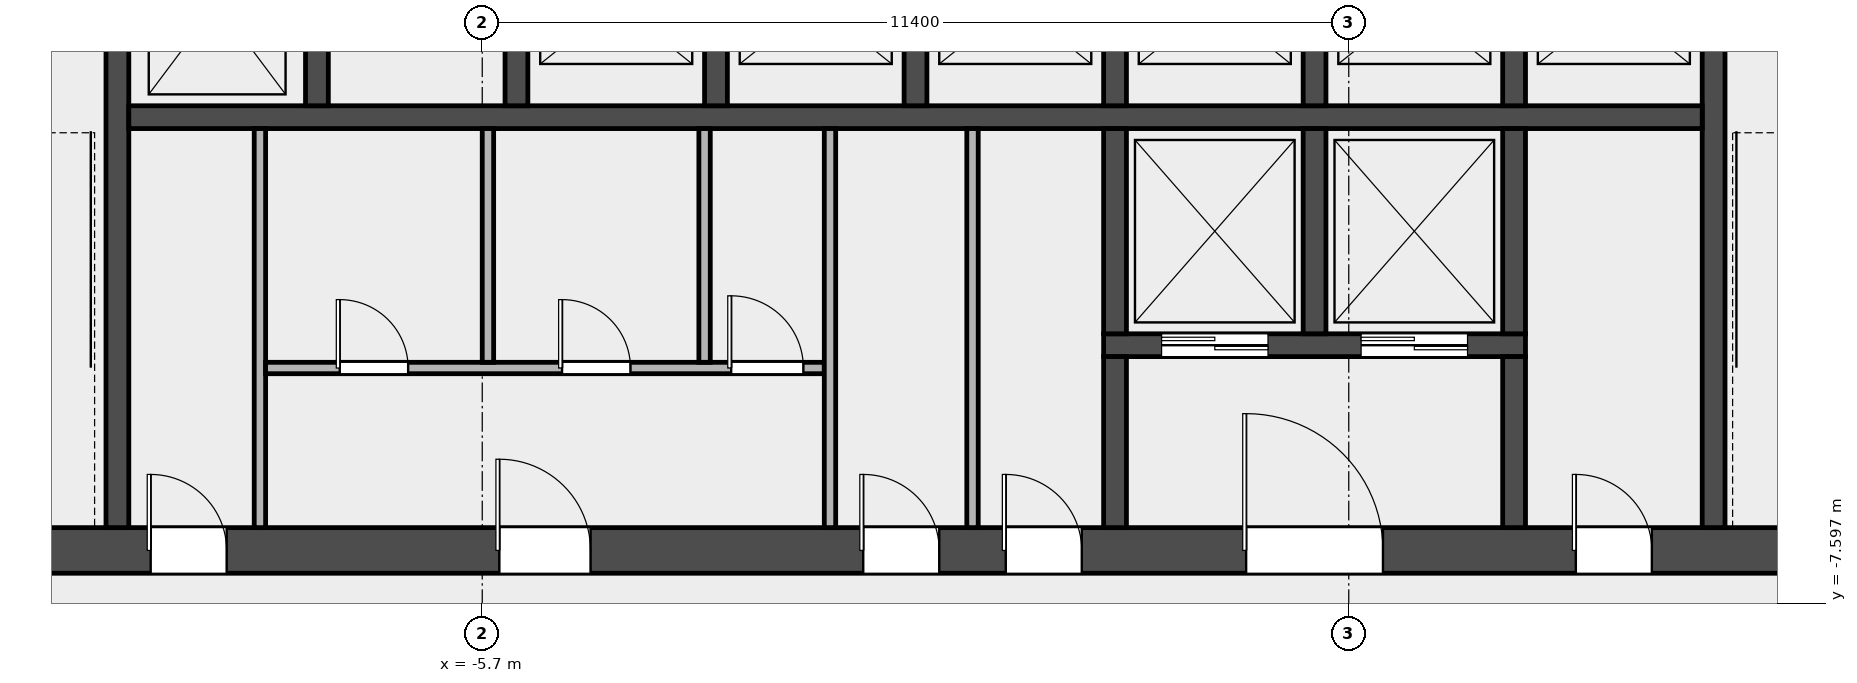
"""IFC4 building model, lengths in metres.
Left out: names, types, materials, properties, quantities, classifications, styles, units other than length and angle.
Written with IfcOpenShell. Run it as: python <this file> out.ifc"""

import sys

from ifc_helpers import new_model, si_unit, direction, frame, frame_2d, origin, place, context, subcontext, project, spatial, rectangle, extrude, element, fill, save


model = new_model("IFC4")
c1 = context("Model", 3, precision=1e-05, world=origin(), true_north=direction((0.0, 1.0)))
c2 = subcontext(c1, "Body", "Model", "MODEL_VIEW")
j1 = project(units=[si_unit("LENGTHUNIT", "METRE"), si_unit("PLANEANGLEUNIT", "RADIAN")], contexts=[c1])
p1 = place(None, origin())
s1 = spatial("IfcSite", under=j1, at=p1, CompositionType="ELEMENT")
p2 = place(p1, origin())
s2 = spatial("IfcBuilding", under=s1, at=p2, CompositionType="ELEMENT")
p3 = place(p2, frame((0.0, 0.0, 157.0)))
s3 = spatial("IfcBuildingStorey", under=s2, at=p3, CompositionType="ELEMENT", Elevation=157.0)
p4 = place(p3, frame((-14.4, -6.9, 0.0), z_axis=(0.0, 0.0, 1.0), x_axis=(1.0, 0.0, 0.0)))
e1 = element("IfcWall", 1, at=p4, inside=s3, PredefinedType="SHEAR", context=c2, shape_type="SweptSolid", body=[
    extrude(rectangle(XDim=28.8, YDim=0.6, at=frame_2d((14.4, 0.0))), origin(), (0.0, 0.0, 1.0), 3.7),
])
p5 = place(p4, frame((4.337, 0.0, 0.0)))
e2 = element("IfcOpeningElement", 2, at=p5, cuts=e1, PredefinedType="OPENING", context=c2, shape_type="SweptSolid", body=[
    extrude(rectangle(XDim=1.0, YDim=2.1, at=frame_2d((0.5, 1.05))), frame((0.0, 0.312, 0.0), z_axis=(0.0, -1.0, 0.0), x_axis=(1.0, 0.0, 0.0)), (0.0, 0.0, 1.0), 0.624),
])
p6 = place(p4, frame((8.925, 0.0, 0.0)))
e3 = element("IfcOpeningElement", 3, at=p6, cuts=e1, PredefinedType="OPENING", context=c2, shape_type="SweptSolid", body=[
    extrude(rectangle(XDim=1.2, YDim=2.1, at=frame_2d((0.6, 1.05))), frame((0.0, 0.312, 0.0), z_axis=(0.0, -1.0, 0.0), x_axis=(1.0, 0.0, 0.0)), (0.0, 0.0, 1.0), 0.624),
])
p7 = place(p4, frame((13.712, 0.0, 0.0)))
e4 = element("IfcOpeningElement", 4, at=p7, cuts=e1, PredefinedType="OPENING", context=c2, shape_type="SweptSolid", body=[
    extrude(rectangle(XDim=1.0, YDim=2.1, at=frame_2d((0.5, 1.05))), frame((0.0, 0.312, 0.0), z_axis=(0.0, -1.0, 0.0), x_axis=(1.0, 0.0, 0.0)), (0.0, 0.0, 1.0), 0.624),
])
p8 = place(p4, frame((15.587, 0.0, 0.0)))
e5 = element("IfcOpeningElement", 5, at=p8, cuts=e1, PredefinedType="OPENING", context=c2, shape_type="SweptSolid", body=[
    extrude(rectangle(XDim=1.0, YDim=2.1, at=frame_2d((0.5, 1.05))), frame((0.0, 0.312, 0.0), z_axis=(0.0, -1.0, 0.0), x_axis=(1.0, 0.0, 0.0)), (0.0, 0.0, 1.0), 0.624),
])
p9 = place(p4, frame((18.75, 0.0, 0.0)))
e6 = element("IfcOpeningElement", 6, at=p9, cuts=e1, PredefinedType="OPENING", context=c2, shape_type="SweptSolid", body=[
    extrude(rectangle(XDim=1.8, YDim=2.1, at=frame_2d((0.9, 1.05))), frame((0.0, 0.312, 0.0), z_axis=(0.0, -1.0, 0.0), x_axis=(1.0, 0.0, 0.0)), (0.0, 0.0, 1.0), 0.624),
])
p10 = place(p4, frame((23.087, 0.0, 0.0)))
e7 = element("IfcOpeningElement", 7, at=p10, cuts=e1, PredefinedType="OPENING", context=c2, shape_type="SweptSolid", body=[
    extrude(rectangle(XDim=1.0, YDim=2.1, at=frame_2d((0.5, 1.05))), frame((0.0, 0.312, 0.0), z_axis=(0.0, -1.0, 0.0), x_axis=(1.0, 0.0, 0.0)), (0.0, 0.0, 1.0), 0.624),
])
for number, where, z_axis, x_axis in (
    (8, (-10.5, -6.6, 0.0), (0.0, 0.0, 1.0), (0.0, 1.0, 0.0)),
    (9, (10.5, -6.6, 0.0), (0.0, 0.0, 1.0), (0.0, 1.0, 0.0)),
):
    element("IfcWall", number, at=place(p3, frame(where, z_axis=z_axis, x_axis=x_axis)), inside=s3, PredefinedType="SHEAR", context=c2, shape_type="SweptSolid", body=[
        extrude(rectangle(XDim=8.55, YDim=0.3, at=frame_2d((4.275, 0.0))), origin(), (0.0, 0.0, 1.0), 3.7),
    ])
p11 = place(p3, frame((-10.35, -1.2, 0.0), z_axis=(0.0, 0.0, 1.0), x_axis=(1.0, 0.0, 0.0)))
e10 = element("IfcWall", 10, at=p11, inside=s3, PredefinedType="SOLIDWALL", context=c2, shape_type="SweptSolid", body=[
    extrude(rectangle(XDim=20.7, YDim=0.3, at=frame_2d((10.35, 0.0))), origin(), (0.0, 0.0, 1.0), 3.7),
])
for number, where, z_axis, x_axis in (
    (11, (-7.875, -1.05, 0.0), (0.0, 0.0, 1.0), (0.0, 1.0, 0.0)),
    (12, (-5.25, -1.05, 0.0), (0.0, 0.0, 1.0), (0.0, 1.0, 0.0)),
    (13, (-2.625, -1.05, 0.0), (0.0, 0.0, 1.0), (0.0, 1.0, 0.0)),
    (14, (0.0, -1.05, 0.0), (0.0, 0.0, 1.0), (0.0, 1.0, 0.0)),
    (15, (2.625, -1.05, 0.0), (0.0, 0.0, 1.0), (0.0, 1.0, 0.0)),
    (16, (5.25, -1.05, 0.0), (0.0, 0.0, 1.0), (0.0, 1.0, 0.0)),
    (17, (7.875, -1.05, 0.0), (0.0, 0.0, 1.0), (0.0, 1.0, 0.0)),
):
    element("IfcWall", number, at=place(p3, frame(where, z_axis=z_axis, x_axis=x_axis)), inside=s3, PredefinedType="SOLIDWALL", context=c2, shape_type="SweptSolid", body=[
        extrude(rectangle(XDim=2.7, YDim=0.3, at=frame_2d((1.35, 0.0))), origin(), (0.0, 0.0, 1.0), 3.7),
    ])
p12 = place(p3, frame((2.475, -4.2, 0.0), z_axis=(0.0, 0.0, 1.0), x_axis=(1.0, 0.0, 0.0)))
e18 = element("IfcWall", 18, at=p12, inside=s3, PredefinedType="SOLIDWALL", context=c2, shape_type="SweptSolid", body=[
    extrude(rectangle(XDim=5.55, YDim=0.3, at=frame_2d((2.775, 0.0))), origin(), (0.0, 0.0, 1.0), 3.7),
])
p13 = place(p12, frame((0.762, 0.0, 0.0)))
e19 = element("IfcOpeningElement", 19, at=p13, cuts=e18, PredefinedType="OPENING", context=c2, shape_type="SweptSolid", body=[
    extrude(rectangle(XDim=1.4, YDim=2.1, at=frame_2d((0.7, 1.05))), frame((0.0, 0.162, 0.0), z_axis=(0.0, -1.0, 0.0), x_axis=(1.0, 0.0, 0.0)), (0.0, 0.0, 1.0), 0.324),
])
p14 = place(p12, frame((3.387, 0.0, 0.0)))
e20 = element("IfcOpeningElement", 20, at=p14, cuts=e18, PredefinedType="OPENING", context=c2, shape_type="SweptSolid", body=[
    extrude(rectangle(XDim=1.4, YDim=2.1, at=frame_2d((0.7, 1.05))), frame((0.0, 0.162, 0.0), z_axis=(0.0, -1.0, 0.0), x_axis=(1.0, 0.0, 0.0)), (0.0, 0.0, 1.0), 0.324),
])
p15 = place(p3, frame((2.625, -4.05, 0.0), z_axis=(0.0, 0.0, 1.0), x_axis=(0.0, 1.0, 0.0)))
e21 = element("IfcWall", 21, at=p15, inside=s3, PredefinedType="SOLIDWALL", context=c2, shape_type="SweptSolid", body=[
    extrude(rectangle(XDim=2.7, YDim=0.3, at=frame_2d((1.35, 0.0))), origin(), (0.0, 0.0, 1.0), 3.7),
])
p16 = place(p3, frame((2.625, -6.6, 0.0), z_axis=(0.0, 0.0, 1.0), x_axis=(0.0, 1.0, 0.0)))
e22 = element("IfcWall", 22, at=p16, inside=s3, PredefinedType="SOLIDWALL", context=c2, shape_type="SweptSolid", body=[
    extrude(rectangle(XDim=2.25, YDim=0.3, at=frame_2d((1.125, 0.0))), origin(), (0.0, 0.0, 1.0), 3.7),
])
for number, where, z_axis, x_axis in (
    (23, (5.25, -4.05, 0.0), (0.0, 0.0, 1.0), (0.0, 1.0, 0.0)),
    (24, (7.875, -4.05, 0.0), (0.0, 0.0, 1.0), (0.0, 1.0, 0.0)),
):
    element("IfcWall", number, at=place(p3, frame(where, z_axis=z_axis, x_axis=x_axis)), inside=s3, PredefinedType="SOLIDWALL", context=c2, shape_type="SweptSolid", body=[
        extrude(rectangle(XDim=2.7, YDim=0.3, at=frame_2d((1.35, 0.0))), origin(), (0.0, 0.0, 1.0), 3.7),
    ])
p17 = place(p3, frame((7.875, -6.6, 0.0), z_axis=(0.0, 0.0, 1.0), x_axis=(0.0, 1.0, 0.0)))
e25 = element("IfcWall", 25, at=p17, inside=s3, PredefinedType="SOLIDWALL", context=c2, shape_type="SweptSolid", body=[
    extrude(rectangle(XDim=2.25, YDim=0.3, at=frame_2d((1.125, 0.0))), origin(), (0.0, 0.0, 1.0), 3.7),
])
p18 = place(p3, frame((-8.625, -6.6, 0.0), z_axis=(0.0, 0.0, 1.0), x_axis=(0.0, 1.0, 0.0)))
e26 = element("IfcWall", 26, at=p18, inside=s3, PredefinedType="PARTITIONING", context=c2, shape_type="SweptSolid", body=[
    extrude(rectangle(XDim=5.25, YDim=0.15, at=frame_2d((2.625, 0.0))), origin(), (0.0, 0.0, 1.0), 3.7),
])
p19 = place(p3, frame((-8.55, -4.5, 0.0), z_axis=(0.0, 0.0, 1.0), x_axis=(1.0, 0.0, 0.0)))
e27 = element("IfcWall", 27, at=p19, inside=s3, PredefinedType="PARTITIONING", context=c2, shape_type="SweptSolid", body=[
    extrude(rectangle(XDim=7.35, YDim=0.15, at=frame_2d((3.675, 0.0))), origin(), (0.0, 0.0, 1.0), 3.7),
])
p20 = place(p19, frame((0.975, 0.0, 0.0)))
e28 = element("IfcOpeningElement", 28, at=p20, cuts=e27, PredefinedType="OPENING", context=c2, shape_type="SweptSolid", body=[
    extrude(rectangle(XDim=0.9, YDim=2.1, at=frame_2d((0.45, 1.05))), frame((0.0, 0.087, 0.0), z_axis=(0.0, -1.0, 0.0), x_axis=(1.0, 0.0, 0.0)), (0.0, 0.0, 1.0), 0.174),
])
p21 = place(p19, frame((3.9, 0.0, 0.0)))
e29 = element("IfcOpeningElement", 29, at=p21, cuts=e27, PredefinedType="OPENING", context=c2, shape_type="SweptSolid", body=[
    extrude(rectangle(XDim=0.9, YDim=2.1, at=frame_2d((0.45, 1.05))), frame((0.0, 0.087, 0.0), z_axis=(0.0, -1.0, 0.0), x_axis=(1.0, 0.0, 0.0)), (0.0, 0.0, 1.0), 0.174),
])
p22 = place(p19, frame((6.125, 0.0, 0.0)))
e30 = element("IfcOpeningElement", 30, at=p22, cuts=e27, PredefinedType="OPENING", context=c2, shape_type="SweptSolid", body=[
    extrude(rectangle(XDim=0.95, YDim=2.1, at=frame_2d((0.475, 1.05))), frame((0.0, 0.087, 0.0), z_axis=(0.0, -1.0, 0.0), x_axis=(1.0, 0.0, 0.0)), (0.0, 0.0, 1.0), 0.174),
])
for number, where, z_axis, x_axis in (
    (31, (-5.625, -4.425, 0.0), (0.0, 0.0, 1.0), (0.0, 1.0, 0.0)),
    (32, (-2.775, -4.425, 0.0), (0.0, 0.0, 1.0), (0.0, 1.0, 0.0)),
):
    element("IfcWall", number, at=place(p3, frame(where, z_axis=z_axis, x_axis=x_axis)), inside=s3, PredefinedType="PARTITIONING", context=c2, shape_type="SweptSolid", body=[
        extrude(rectangle(XDim=3.075, YDim=0.15, at=frame_2d((1.538, 0.0))), origin(), (0.0, 0.0, 1.0), 3.7),
    ])
for number, where, z_axis, x_axis in (
    (33, (-1.125, -6.6, 0.0), (0.0, 0.0, 1.0), (0.0, 1.0, 0.0)),
    (34, (0.75, -6.6, 0.0), (0.0, 0.0, 1.0), (0.0, 1.0, 0.0)),
):
    element("IfcWall", number, at=place(p3, frame(where, z_axis=z_axis, x_axis=x_axis)), inside=s3, PredefinedType="PARTITIONING", context=c2, shape_type="SweptSolid", body=[
        extrude(rectangle(XDim=5.25, YDim=0.15, at=frame_2d((2.625, 0.0))), origin(), (0.0, 0.0, 1.0), 3.7),
    ])
p23 = place(p13, origin())
e35 = element("IfcDoor", 35, at=p23, inside=s3, OperationType="DOUBLE_DOOR_SLIDING", PredefinedType="DOOR", context=c2, shape_type="SweptSolid", body=[
    extrude(rectangle(XDim=1.4, YDim=2.1, at=frame_2d((0.7, 1.05))), frame((0.0, 0.025, 0.0), z_axis=(0.0, -1.0, 0.0), x_axis=(1.0, 0.0, 0.0)), (0.0, 0.0, 1.0), 0.05),
])
fill(e19, e35)
p24 = place(p14, origin())
e36 = element("IfcDoor", 36, at=p24, inside=s3, OperationType="DOUBLE_DOOR_SLIDING", PredefinedType="DOOR", context=c2, shape_type="SweptSolid", body=[
    extrude(rectangle(XDim=1.4, YDim=2.1, at=frame_2d((0.7, 1.05))), frame((0.0, 0.025, 0.0), z_axis=(0.0, -1.0, 0.0), x_axis=(1.0, 0.0, 0.0)), (0.0, 0.0, 1.0), 0.05),
])
fill(e20, e36)
p25 = place(p5, origin())
e37 = element("IfcDoor", 37, at=p25, inside=s3, OperationType="SINGLE_SWING_LEFT", PredefinedType="DOOR", context=c2, shape_type="SweptSolid", body=[
    extrude(rectangle(XDim=1.0, YDim=2.1, at=frame_2d((0.5, 1.05))), frame((0.0, 0.025, 0.0), z_axis=(0.0, -1.0, 0.0), x_axis=(1.0, 0.0, 0.0)), (0.0, 0.0, 1.0), 0.05),
])
fill(e2, e37)
p26 = place(p6, origin())
e38 = element("IfcDoor", 38, at=p26, inside=s3, OperationType="SINGLE_SWING_LEFT", PredefinedType="DOOR", context=c2, shape_type="SweptSolid", body=[
    extrude(rectangle(XDim=1.2, YDim=2.1, at=frame_2d((0.6, 1.05))), frame((0.0, 0.025, 0.0), z_axis=(0.0, -1.0, 0.0), x_axis=(1.0, 0.0, 0.0)), (0.0, 0.0, 1.0), 0.05),
])
fill(e3, e38)
p27 = place(p20, origin())
e39 = element("IfcDoor", 39, at=p27, inside=s3, OperationType="SINGLE_SWING_LEFT", PredefinedType="DOOR", context=c2, shape_type="SweptSolid", body=[
    extrude(rectangle(XDim=0.9, YDim=2.1, at=frame_2d((0.45, 1.05))), frame((0.0, 0.025, 0.0), z_axis=(0.0, -1.0, 0.0), x_axis=(1.0, 0.0, 0.0)), (0.0, 0.0, 1.0), 0.05),
])
fill(e28, e39)
p28 = place(p21, origin())
e40 = element("IfcDoor", 40, at=p28, inside=s3, OperationType="SINGLE_SWING_LEFT", PredefinedType="DOOR", context=c2, shape_type="SweptSolid", body=[
    extrude(rectangle(XDim=0.9, YDim=2.1, at=frame_2d((0.45, 1.05))), frame((0.0, 0.025, 0.0), z_axis=(0.0, -1.0, 0.0), x_axis=(1.0, 0.0, 0.0)), (0.0, 0.0, 1.0), 0.05),
])
fill(e29, e40)
p29 = place(p22, origin())
e41 = element("IfcDoor", 41, at=p29, inside=s3, OperationType="SINGLE_SWING_LEFT", PredefinedType="DOOR", context=c2, shape_type="SweptSolid", body=[
    extrude(rectangle(XDim=0.95, YDim=2.1, at=frame_2d((0.475, 1.05))), frame((0.0, 0.025, 0.0), z_axis=(0.0, -1.0, 0.0), x_axis=(1.0, 0.0, 0.0)), (0.0, 0.0, 1.0), 0.05),
])
fill(e30, e41)
p30 = place(p7, origin())
e42 = element("IfcDoor", 42, at=p30, inside=s3, OperationType="SINGLE_SWING_LEFT", PredefinedType="DOOR", context=c2, shape_type="SweptSolid", body=[
    extrude(rectangle(XDim=1.0, YDim=2.1, at=frame_2d((0.5, 1.05))), frame((0.0, 0.025, 0.0), z_axis=(0.0, -1.0, 0.0), x_axis=(1.0, 0.0, 0.0)), (0.0, 0.0, 1.0), 0.05),
])
fill(e4, e42)
p31 = place(p8, origin())
e43 = element("IfcDoor", 43, at=p31, inside=s3, OperationType="SINGLE_SWING_LEFT", PredefinedType="DOOR", context=c2, shape_type="SweptSolid", body=[
    extrude(rectangle(XDim=1.0, YDim=2.1, at=frame_2d((0.5, 1.05))), frame((0.0, 0.025, 0.0), z_axis=(0.0, -1.0, 0.0), x_axis=(1.0, 0.0, 0.0)), (0.0, 0.0, 1.0), 0.05),
])
fill(e5, e43)
p32 = place(p9, origin())
e44 = element("IfcDoor", 44, at=p32, inside=s3, OperationType="DOUBLE_DOOR_SINGLE_SWING", PredefinedType="DOOR", context=c2, shape_type="SweptSolid", body=[
    extrude(rectangle(XDim=1.8, YDim=2.1, at=frame_2d((0.9, 1.05))), frame((0.0, 0.025, 0.0), z_axis=(0.0, -1.0, 0.0), x_axis=(1.0, 0.0, 0.0)), (0.0, 0.0, 1.0), 0.05),
])
fill(e6, e44)
p33 = place(p10, origin())
e45 = element("IfcDoor", 45, at=p33, inside=s3, OperationType="SINGLE_SWING_LEFT", PredefinedType="DOOR", context=c2, shape_type="SweptSolid", body=[
    extrude(rectangle(XDim=1.0, YDim=2.1, at=frame_2d((0.5, 1.05))), frame((0.0, 0.025, 0.0), z_axis=(0.0, -1.0, 0.0), x_axis=(1.0, 0.0, 0.0)), (0.0, 0.0, 1.0), 0.05),
])
fill(e7, e45)
save(model, sys.argv[1])
